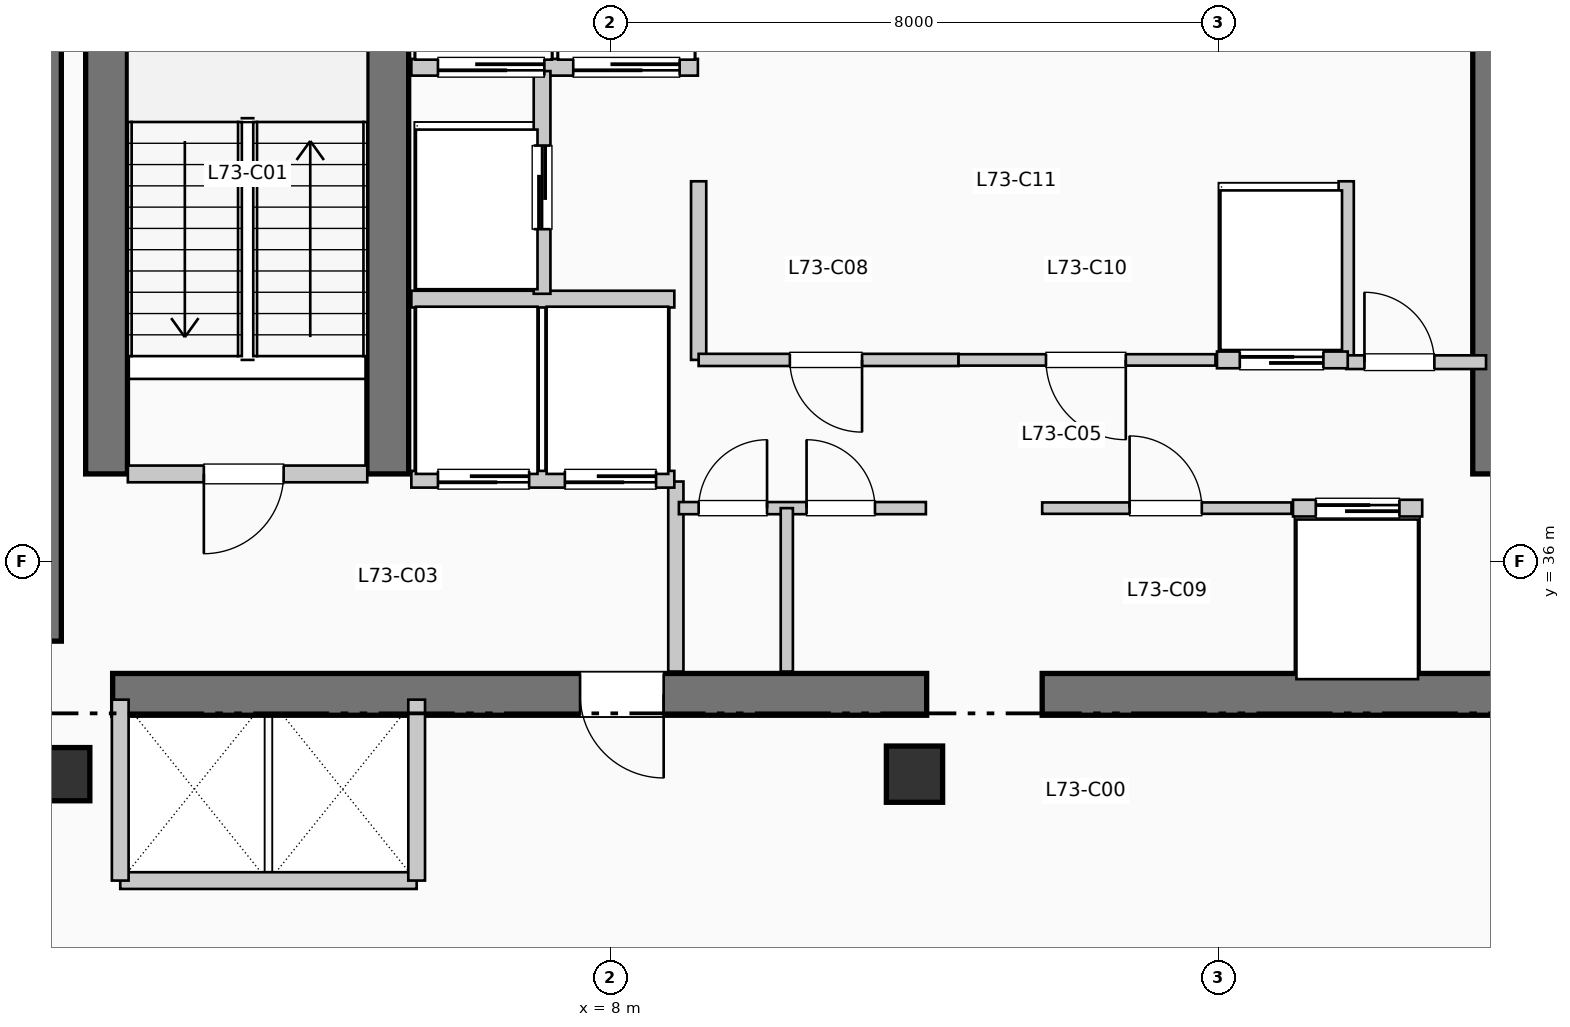
"""IFC4 building model, lengths in metres.
Left out: names, types, materials, properties, quantities, classifications, styles, units other than length and angle.
Written with IfcOpenShell. Run it as: python <this file> out.ifc"""

import sys

from ifc_helpers import new_model, si_unit, direction, frame, frame_2d, origin, origin_2d, place, context, subcontext, project, spatial, rectangle, extrude, element, fill, save


model = new_model("IFC4")
c1 = context("Model", 3, precision=1e-05, world=origin(), true_north=direction((0.0, 1.0)))
c2 = subcontext(c1, "Body", "Model", "MODEL_VIEW")
j1 = project(units=[si_unit("LENGTHUNIT", "METRE"), si_unit("PLANEANGLEUNIT", "RADIAN")], contexts=[c1])
p1 = place(None, origin())
s1 = spatial("IfcSite", under=j1, at=p1, CompositionType="ELEMENT")
p2 = place(p1, origin())
s2 = spatial("IfcBuilding", under=s1, at=p2, CompositionType="ELEMENT")
p3 = place(p2, frame((0.0, 0.0, 299.97)))
s3 = spatial("IfcBuildingStorey", under=s2, at=p3, CompositionType="ELEMENT", Elevation=299.97)
p4 = place(p3, frame((0.5, 34.95, 0.0), z_axis=(0.0, 0.0, 1.0), x_axis=(0.0, 1.0, 0.0)))
e1 = element("IfcWall", 1, at=p4, inside=s3, PredefinedType="SHEAR", context=c2, shape_type="SweptSolid", body=[
    extrude(rectangle(XDim=7.9, YDim=0.55, at=frame_2d((3.95, 0.0))), origin(), (0.0, 0.0, 1.0), 3.96),
])
p5 = place(p3, frame((1.45, 34.25, 0.0), z_axis=(0.0, 0.0, 1.0), x_axis=(1.0, 0.0, 0.0)))
e2 = element("IfcWall", 2, at=p5, inside=s3, PredefinedType="SHEAR", context=c2, shape_type="SweptSolid", body=[
    extrude(rectangle(XDim=10.71, YDim=0.55, at=frame_2d((5.355, 0.0))), origin(), (0.0, 0.0, 1.0), 3.96),
])
p6 = place(p5, frame((7.25, 0.0, 0.0), z_axis=(0.0, 0.0, 1.0), x_axis=(-1.0, 0.0, 0.0)))
e3 = element("IfcOpeningElement", 3, at=p6, cuts=e2, PredefinedType="OPENING", context=c2, shape_type="SweptSolid", body=[
    extrude(rectangle(XDim=1.1, YDim=2.15, at=frame_2d((0.55, 1.075))), frame((0.0, 0.285, 0.0), z_axis=(0.0, -1.0, 0.0), x_axis=(1.0, 0.0, 0.0)), (0.0, 0.0, 1.0), 0.57),
])
p7 = place(p3, frame((13.68, 34.25, 0.0), z_axis=(0.0, 0.0, 1.0), x_axis=(1.0, 0.0, 0.0)))
e4 = element("IfcWall", 4, at=p7, inside=s3, PredefinedType="SHEAR", context=c2, shape_type="SweptSolid", body=[
    extrude(rectangle(XDim=6.12, YDim=0.55, at=frame_2d((3.06, 0.0))), origin(), (0.0, 0.0, 1.0), 3.96),
])
for number, where, z_axis, x_axis in (
    (5, (1.37, 37.15, 0.0), (0.0, 0.0, 1.0), (0.0, 1.0, 0.0)),
    (6, (5.07, 37.15, 0.0), (0.0, 0.0, 1.0), (0.0, 1.0, 0.0)),
    (7, (19.62, 37.15, 0.0), (0.0, 0.0, 1.0), (0.0, 1.0, 0.0)),
):
    element("IfcWall", number, at=place(p3, frame(where, z_axis=z_axis, x_axis=x_axis)), inside=s3, PredefinedType="SHEAR", context=c2, shape_type="SweptSolid", body=[
        extrude(rectangle(XDim=7.89, YDim=0.55, at=frame_2d((3.945, 0.0))), origin(), (0.0, 0.0, 1.0), 3.96),
    ])
p8 = place(p3, frame((0.8, 33.2, 0.0), z_axis=(0.0, 0.0, 1.0), x_axis=(1.0, 0.0, 0.0)))
e8 = element("IfcColumn", 8, at=p8, inside=s3, PredefinedType="COLUMN", context=c2, shape_type="SweptSolid", body=[
    extrude(rectangle(XDim=0.7, YDim=0.7, at=origin_2d()), origin(), (0.0, 0.0, 1.0), 3.96),
])
p9 = place(p3, frame((12.0, 33.2, 0.0), z_axis=(0.0, 0.0, 1.0), x_axis=(1.0, 0.0, 0.0)))
e9 = element("IfcColumn", 9, at=p9, inside=s3, PredefinedType="COLUMN", context=c2, shape_type="SweptSolid", body=[
    extrude(rectangle(XDim=0.74, YDim=0.74, at=origin_2d()), origin(), (0.0, 0.0, 1.0), 3.96),
])
p10 = place(p3, frame((1.65, 37.15, 0.0), z_axis=(0.0, 0.0, 1.0), x_axis=(1.0, 0.0, 0.0)))
e10 = element("IfcWall", 10, at=p10, inside=s3, PredefinedType="PARTITIONING", context=c2, shape_type="SweptSolid", body=[
    extrude(rectangle(XDim=3.15, YDim=0.22, at=frame_2d((1.575, 0.0))), origin(), (0.0, 0.0, 1.0), 3.74),
])
p11 = place(p10, frame((2.05, 0.0, 0.0), z_axis=(0.0, 0.0, 1.0), x_axis=(-1.0, 0.0, 0.0)))
e11 = element("IfcOpeningElement", 11, at=p11, cuts=e10, PredefinedType="OPENING", context=c2, shape_type="SweptSolid", body=[
    extrude(rectangle(XDim=1.05, YDim=2.15, at=frame_2d((0.525, 1.075))), frame((0.0, 0.12, 0.0), z_axis=(0.0, -1.0, 0.0), x_axis=(1.0, 0.0, 0.0)), (0.0, 0.0, 1.0), 0.24),
])
p12 = place(p3, frame((8.86, 34.55, 0.0), z_axis=(0.0, 0.0, 1.0), x_axis=(0.0, 1.0, 0.0)))
e12 = element("IfcWall", 12, at=p12, inside=s3, PredefinedType="PARTITIONING", context=c2, shape_type="SweptSolid", body=[
    extrude(rectangle(XDim=2.5, YDim=0.2, at=frame_2d((1.25, 0.0))), origin(), (0.0, 0.0, 1.0), 3.74),
])
p13 = place(p3, frame((5.38, 37.08, 0.0), z_axis=(0.0, 0.0, 1.0), x_axis=(1.0, 0.0, 0.0)))
e13 = element("IfcWall", 13, at=p13, inside=s3, PredefinedType="PARTITIONING", context=c2, shape_type="SweptSolid", body=[
    extrude(rectangle(XDim=3.46, YDim=0.22, at=frame_2d((1.73, 0.0))), origin(), (0.0, 0.0, 1.0), 3.74),
])
p14 = place(p13, frame((1.55, 0.0, 0.0), z_axis=(0.0, 0.0, 1.0), x_axis=(-1.0, 0.0, 0.0)))
e14 = element("IfcOpeningElement", 14, at=p14, cuts=e13, PredefinedType="OPENING", context=c2, shape_type="SweptSolid", body=[
    extrude(rectangle(XDim=1.2, YDim=2.2, at=frame_2d((0.6, 1.1))), frame((0.0, 0.12, 0.0), z_axis=(0.0, -1.0, 0.0), x_axis=(1.0, 0.0, 0.0)), (0.0, 0.0, 1.0), 0.24),
])
p15 = place(p13, frame((3.22, 0.0, 0.0), z_axis=(0.0, 0.0, 1.0), x_axis=(-1.0, 0.0, 0.0)))
e15 = element("IfcOpeningElement", 15, at=p15, cuts=e13, PredefinedType="OPENING", context=c2, shape_type="SweptSolid", body=[
    extrude(rectangle(XDim=1.2, YDim=2.2, at=frame_2d((0.6, 1.1))), frame((0.0, 0.12, 0.0), z_axis=(0.0, -1.0, 0.0), x_axis=(1.0, 0.0, 0.0)), (0.0, 0.0, 1.0), 0.24),
])
p16 = place(p3, frame((5.38, 39.45, 0.0), z_axis=(0.0, 0.0, 1.0), x_axis=(1.0, 0.0, 0.0)))
e16 = element("IfcWall", 16, at=p16, inside=s3, PredefinedType="PARTITIONING", context=c2, shape_type="SweptSolid", body=[
    extrude(rectangle(XDim=3.46, YDim=0.22, at=frame_2d((1.73, 0.0))), origin(), (0.0, 0.0, 1.0), 3.74),
])
p17 = place(p3, frame((5.38, 42.5, 0.0), z_axis=(0.0, 0.0, 1.0), x_axis=(1.0, 0.0, 0.0)))
e17 = element("IfcWall", 17, at=p17, inside=s3, PredefinedType="PARTITIONING", context=c2, shape_type="SweptSolid", body=[
    extrude(rectangle(XDim=3.77, YDim=0.22, at=frame_2d((1.885, 0.0))), origin(), (0.0, 0.0, 1.0), 3.74),
])
p18 = place(p17, frame((1.75, 0.0, 0.0), z_axis=(0.0, 0.0, 1.0), x_axis=(-1.0, 0.0, 0.0)))
e18 = element("IfcOpeningElement", 18, at=p18, cuts=e17, PredefinedType="OPENING", context=c2, shape_type="SweptSolid", body=[
    extrude(rectangle(XDim=1.4, YDim=2.2, at=frame_2d((0.7, 1.1))), frame((0.0, 0.12, 0.0), z_axis=(0.0, -1.0, 0.0), x_axis=(1.0, 0.0, 0.0)), (0.0, 0.0, 1.0), 0.24),
])
p19 = place(p17, frame((3.53, 0.0, 0.0), z_axis=(0.0, 0.0, 1.0), x_axis=(-1.0, 0.0, 0.0)))
e19 = element("IfcOpeningElement", 19, at=p19, cuts=e17, PredefinedType="OPENING", context=c2, shape_type="SweptSolid", body=[
    extrude(rectangle(XDim=1.4, YDim=2.2, at=frame_2d((0.7, 1.1))), frame((0.0, 0.12, 0.0), z_axis=(0.0, -1.0, 0.0), x_axis=(1.0, 0.0, 0.0)), (0.0, 0.0, 1.0), 0.24),
])
p20 = place(p3, frame((7.1, 39.52, 0.0), z_axis=(0.0, 0.0, 1.0), x_axis=(0.0, 1.0, 0.0)))
e20 = element("IfcWall", 20, at=p20, inside=s3, PredefinedType="PARTITIONING", context=c2, shape_type="SweptSolid", body=[
    extrude(rectangle(XDim=2.93, YDim=0.22, at=frame_2d((1.465, 0.0))), origin(), (0.0, 0.0, 1.0), 3.74),
])
p21 = place(p20, frame((0.85, 0.0, 0.0)))
e21 = element("IfcOpeningElement", 21, at=p21, cuts=e20, PredefinedType="OPENING", context=c2, shape_type="SweptSolid", body=[
    extrude(rectangle(XDim=1.1, YDim=2.2, at=frame_2d((0.55, 1.1))), frame((0.0, 0.12, 0.0), z_axis=(0.0, -1.0, 0.0), x_axis=(1.0, 0.0, 0.0)), (0.0, 0.0, 1.0), 0.24),
])
p22 = place(p3, frame((1.55, 31.8, 0.0), z_axis=(0.0, 0.0, 1.0), x_axis=(1.0, 0.0, 0.0)))
e22 = element("IfcWall", 22, at=p22, inside=s3, PredefinedType="PARTITIONING", context=c2, shape_type="SweptSolid", body=[
    extrude(rectangle(XDim=3.9, YDim=0.22, at=frame_2d((1.95, 0.0))), origin(), (0.0, 0.0, 1.0), 3.74),
])
for number, where, z_axis, x_axis in (
    (23, (1.55, 31.8, 0.0), (0.0, 0.0, 1.0), (0.0, 1.0, 0.0)),
    (24, (5.45, 31.8, 0.0), (0.0, 0.0, 1.0), (0.0, 1.0, 0.0)),
):
    element("IfcWall", number, at=place(p3, frame(where, z_axis=z_axis, x_axis=x_axis)), inside=s3, PredefinedType="PARTITIONING", context=c2, shape_type="SweptSolid", body=[
        extrude(rectangle(XDim=2.38, YDim=0.22, at=frame_2d((1.19, 0.0))), origin(), (0.0, 0.0, 1.0), 3.74),
    ])
for number, where, z_axis, x_axis in (
    (25, (9.16, 38.65, 0.0), (0.0, 0.0, 1.0), (0.0, 1.0, 0.0)),
    (26, (17.68, 38.65, 0.0), (0.0, 0.0, 1.0), (0.0, 1.0, 0.0)),
):
    element("IfcWall", number, at=place(p3, frame(where, z_axis=z_axis, x_axis=x_axis)), inside=s3, PredefinedType="PARTITIONING", context=c2, shape_type="SweptSolid", body=[
        extrude(rectangle(XDim=2.35, YDim=0.2, at=frame_2d((1.175, 0.0))), origin(), (0.0, 0.0, 1.0), 3.74),
    ])
p23 = place(p3, frame((17.68, 38.62, 0.0), z_axis=(0.0, 0.0, 1.0), x_axis=(1.0, 0.0, 0.0)))
e27 = element("IfcWall", 27, at=p23, inside=s3, PredefinedType="PARTITIONING", context=c2, shape_type="SweptSolid", body=[
    extrude(rectangle(XDim=1.84, YDim=0.18, at=frame_2d((0.92, 0.0))), origin(), (0.0, 0.0, 1.0), 3.74),
])
p24 = place(p23, frame((0.24, 0.0, 0.0)))
e28 = element("IfcOpeningElement", 28, at=p24, cuts=e27, PredefinedType="OPENING", context=c2, shape_type="SweptSolid", body=[
    extrude(rectangle(XDim=0.92, YDim=2.1, at=frame_2d((0.46, 1.05))), frame((0.0, 0.1, 0.0), z_axis=(0.0, -1.0, 0.0), x_axis=(1.0, 0.0, 0.0)), (0.0, 0.0, 1.0), 0.2),
])
p25 = place(p3, frame((8.9, 36.7, 0.0), z_axis=(0.0, 0.0, 1.0), x_axis=(1.0, 0.0, 0.0)))
e29 = element("IfcWall", 29, at=p25, inside=s3, PredefinedType="PARTITIONING", context=c2, shape_type="SweptSolid", body=[
    extrude(rectangle(XDim=3.25, YDim=0.16, at=frame_2d((1.625, 0.0))), origin(), (0.0, 0.0, 1.0), 3.74),
])
p26 = place(p25, frame((0.26, 0.0, 0.0)))
e30 = element("IfcOpeningElement", 30, at=p26, cuts=e29, PredefinedType="OPENING", context=c2, shape_type="SweptSolid", body=[
    extrude(rectangle(XDim=0.9, YDim=2.15, at=frame_2d((0.45, 1.075))), frame((0.0, 0.09, 0.0), z_axis=(0.0, -1.0, 0.0), x_axis=(1.0, 0.0, 0.0)), (0.0, 0.0, 1.0), 0.18),
])
p27 = place(p25, frame((1.68, 0.0, 0.0)))
e31 = element("IfcOpeningElement", 31, at=p27, cuts=e29, PredefinedType="OPENING", context=c2, shape_type="SweptSolid", body=[
    extrude(rectangle(XDim=0.9, YDim=2.15, at=frame_2d((0.45, 1.075))), frame((0.0, 0.09, 0.0), z_axis=(0.0, -1.0, 0.0), x_axis=(1.0, 0.0, 0.0)), (0.0, 0.0, 1.0), 0.18),
])
p28 = place(p3, frame((10.32, 34.55, 0.0), z_axis=(0.0, 0.0, 1.0), x_axis=(0.0, 1.0, 0.0)))
e32 = element("IfcWall", 32, at=p28, inside=s3, PredefinedType="PARTITIONING", context=c2, shape_type="SweptSolid", body=[
    extrude(rectangle(XDim=2.15, YDim=0.16, at=frame_2d((1.075, 0.0))), origin(), (0.0, 0.0, 1.0), 3.74),
])
p29 = place(p3, frame((9.16, 38.65, 0.0), z_axis=(0.0, 0.0, 1.0), x_axis=(1.0, 0.0, 0.0)))
e33 = element("IfcWall", 33, at=p29, inside=s3, PredefinedType="PARTITIONING", context=c2, shape_type="SweptSolid", body=[
    extrude(rectangle(XDim=3.42, YDim=0.16, at=frame_2d((1.71, 0.0))), origin(), (0.0, 0.0, 1.0), 3.74),
])
p30 = place(p29, frame((2.15, 0.0, 0.0), z_axis=(0.0, 0.0, 1.0), x_axis=(-1.0, 0.0, 0.0)))
e34 = element("IfcOpeningElement", 34, at=p30, cuts=e33, PredefinedType="OPENING", context=c2, shape_type="SweptSolid", body=[
    extrude(rectangle(XDim=0.95, YDim=2.15, at=frame_2d((0.475, 1.075))), frame((0.0, 0.09, 0.0), z_axis=(0.0, -1.0, 0.0), x_axis=(1.0, 0.0, 0.0)), (0.0, 0.0, 1.0), 0.18),
])
p31 = place(p3, frame((13.68, 36.7, 0.0), z_axis=(0.0, 0.0, 1.0), x_axis=(1.0, 0.0, 0.0)))
e35 = element("IfcWall", 35, at=p31, inside=s3, PredefinedType="PARTITIONING", context=c2, shape_type="SweptSolid", body=[
    extrude(rectangle(XDim=3.28, YDim=0.15, at=frame_2d((1.64, 0.0))), origin(), (0.0, 0.0, 1.0), 3.74),
])
p32 = place(p31, frame((1.15, 0.0, 0.0)))
e36 = element("IfcOpeningElement", 36, at=p32, cuts=e35, PredefinedType="OPENING", context=c2, shape_type="SweptSolid", body=[
    extrude(rectangle(XDim=0.95, YDim=2.15, at=frame_2d((0.475, 1.075))), frame((0.0, 0.085, 0.0), z_axis=(0.0, -1.0, 0.0), x_axis=(1.0, 0.0, 0.0)), (0.0, 0.0, 1.0), 0.17),
])
p33 = place(p3, frame((12.58, 38.65, 0.0), z_axis=(0.0, 0.0, 1.0), x_axis=(1.0, 0.0, 0.0)))
e37 = element("IfcWall", 37, at=p33, inside=s3, PredefinedType="PARTITIONING", context=c2, shape_type="SweptSolid", body=[
    extrude(rectangle(XDim=3.38, YDim=0.15, at=frame_2d((1.69, 0.0))), origin(), (0.0, 0.0, 1.0), 3.74),
])
p34 = place(p33, frame((2.2, 0.0, 0.0), z_axis=(0.0, 0.0, 1.0), x_axis=(-1.0, 0.0, 0.0)))
e38 = element("IfcOpeningElement", 38, at=p34, cuts=e37, PredefinedType="OPENING", context=c2, shape_type="SweptSolid", body=[
    extrude(rectangle(XDim=1.05, YDim=2.15, at=frame_2d((0.525, 1.075))), frame((0.0, 0.085, 0.0), z_axis=(0.0, -1.0, 0.0), x_axis=(1.0, 0.0, 0.0)), (0.0, 0.0, 1.0), 0.17),
])
p35 = place(p3, frame((16.98, 36.7, 0.0), z_axis=(0.0, 0.0, 1.0), x_axis=(1.0, 0.0, 0.0)))
e39 = element("IfcWall", 39, at=p35, inside=s3, PredefinedType="PARTITIONING", context=c2, shape_type="SweptSolid", body=[
    extrude(rectangle(XDim=1.7, YDim=0.22, at=frame_2d((0.85, 0.0))), origin(), (0.0, 0.0, 1.0), 3.74),
])
p36 = place(p35, frame((0.3, 0.0, 0.0)))
e40 = element("IfcOpeningElement", 40, at=p36, cuts=e39, PredefinedType="OPENING", context=c2, shape_type="SweptSolid", body=[
    extrude(rectangle(XDim=1.1, YDim=2.2, at=frame_2d((0.55, 1.1))), frame((0.0, 0.12, 0.0), z_axis=(0.0, -1.0, 0.0), x_axis=(1.0, 0.0, 0.0)), (0.0, 0.0, 1.0), 0.24),
])
p37 = place(p3, frame((15.98, 38.65, 0.0), z_axis=(0.0, 0.0, 1.0), x_axis=(1.0, 0.0, 0.0)))
e41 = element("IfcWall", 41, at=p37, inside=s3, PredefinedType="PARTITIONING", context=c2, shape_type="SweptSolid", body=[
    extrude(rectangle(XDim=1.72, YDim=0.22, at=frame_2d((0.86, 0.0))), origin(), (0.0, 0.0, 1.0), 3.74),
])
p38 = place(p37, frame((0.3, 0.0, 0.0)))
e42 = element("IfcOpeningElement", 42, at=p38, cuts=e41, PredefinedType="OPENING", context=c2, shape_type="SweptSolid", body=[
    extrude(rectangle(XDim=1.1, YDim=2.2, at=frame_2d((0.55, 1.1))), frame((0.0, 0.12, 0.0), z_axis=(0.0, -1.0, 0.0), x_axis=(1.0, 0.0, 0.0)), (0.0, 0.0, 1.0), 0.24),
])
p39 = place(p11, origin())
e43 = element("IfcDoor", 43, at=p39, inside=s3, OperationType="SINGLE_SWING_LEFT", PredefinedType="DOOR", context=c2, shape_type="SweptSolid", body=[
    extrude(rectangle(XDim=1.05, YDim=2.15, at=frame_2d((0.525, 1.075))), frame((0.0, 0.025, 0.0), z_axis=(0.0, -1.0, 0.0), x_axis=(1.0, 0.0, 0.0)), (0.0, 0.0, 1.0), 0.05),
])
fill(e11, e43)
p40 = place(p6, origin())
e44 = element("IfcDoor", 44, at=p40, inside=s3, OperationType="SINGLE_SWING_RIGHT", PredefinedType="DOOR", context=c2, shape_type="SweptSolid", body=[
    extrude(rectangle(XDim=1.1, YDim=2.15, at=frame_2d((0.55, 1.075))), frame((0.0, 0.025, 0.0), z_axis=(0.0, -1.0, 0.0), x_axis=(1.0, 0.0, 0.0)), (0.0, 0.0, 1.0), 0.05),
])
fill(e3, e44)
p41 = place(p14, origin())
e45 = element("IfcDoor", 45, at=p41, inside=s3, OperationType="SLIDING_TO_RIGHT", PredefinedType="DOOR", context=c2, shape_type="SweptSolid", body=[
    extrude(rectangle(XDim=1.2, YDim=2.2, at=frame_2d((0.6, 1.1))), frame((0.0, 0.025, 0.0), z_axis=(0.0, -1.0, 0.0), x_axis=(1.0, 0.0, 0.0)), (0.0, 0.0, 1.0), 0.05),
])
fill(e14, e45)
p42 = place(p15, origin())
e46 = element("IfcDoor", 46, at=p42, inside=s3, OperationType="SLIDING_TO_RIGHT", PredefinedType="DOOR", context=c2, shape_type="SweptSolid", body=[
    extrude(rectangle(XDim=1.2, YDim=2.2, at=frame_2d((0.6, 1.1))), frame((0.0, 0.025, 0.0), z_axis=(0.0, -1.0, 0.0), x_axis=(1.0, 0.0, 0.0)), (0.0, 0.0, 1.0), 0.05),
])
fill(e15, e46)
p43 = place(p18, origin())
e47 = element("IfcDoor", 47, at=p43, inside=s3, OperationType="SLIDING_TO_LEFT", PredefinedType="DOOR", context=c2, shape_type="SweptSolid", body=[
    extrude(rectangle(XDim=1.4, YDim=2.2, at=frame_2d((0.7, 1.1))), frame((0.0, 0.025, 0.0), z_axis=(0.0, -1.0, 0.0), x_axis=(1.0, 0.0, 0.0)), (0.0, 0.0, 1.0), 0.05),
])
fill(e18, e47)
p44 = place(p19, origin())
e48 = element("IfcDoor", 48, at=p44, inside=s3, OperationType="SLIDING_TO_LEFT", PredefinedType="DOOR", context=c2, shape_type="SweptSolid", body=[
    extrude(rectangle(XDim=1.4, YDim=2.2, at=frame_2d((0.7, 1.1))), frame((0.0, 0.025, 0.0), z_axis=(0.0, -1.0, 0.0), x_axis=(1.0, 0.0, 0.0)), (0.0, 0.0, 1.0), 0.05),
])
fill(e19, e48)
p45 = place(p21, origin())
e49 = element("IfcDoor", 49, at=p45, inside=s3, OperationType="SLIDING_TO_LEFT", PredefinedType="DOOR", context=c2, shape_type="SweptSolid", body=[
    extrude(rectangle(XDim=1.1, YDim=2.2, at=frame_2d((0.55, 1.1))), frame((0.0, 0.025, 0.0), z_axis=(0.0, -1.0, 0.0), x_axis=(1.0, 0.0, 0.0)), (0.0, 0.0, 1.0), 0.05),
])
fill(e21, e49)
p46 = place(p24, origin())
e50 = element("IfcDoor", 50, at=p46, inside=s3, OperationType="SINGLE_SWING_LEFT", PredefinedType="DOOR", context=c2, shape_type="SweptSolid", body=[
    extrude(rectangle(XDim=0.92, YDim=2.1, at=frame_2d((0.46, 1.05))), frame((0.0, 0.025, 0.0), z_axis=(0.0, -1.0, 0.0), x_axis=(1.0, 0.0, 0.0)), (0.0, 0.0, 1.0), 0.05),
])
fill(e28, e50)
p47 = place(p26, origin())
e51 = element("IfcDoor", 51, at=p47, inside=s3, OperationType="SINGLE_SWING_RIGHT", PredefinedType="DOOR", context=c2, shape_type="SweptSolid", body=[
    extrude(rectangle(XDim=0.9, YDim=2.15, at=frame_2d((0.45, 1.075))), frame((0.0, 0.025, 0.0), z_axis=(0.0, -1.0, 0.0), x_axis=(1.0, 0.0, 0.0)), (0.0, 0.0, 1.0), 0.05),
])
fill(e30, e51)
p48 = place(p27, origin())
e52 = element("IfcDoor", 52, at=p48, inside=s3, OperationType="SINGLE_SWING_LEFT", PredefinedType="DOOR", context=c2, shape_type="SweptSolid", body=[
    extrude(rectangle(XDim=0.9, YDim=2.15, at=frame_2d((0.45, 1.075))), frame((0.0, 0.025, 0.0), z_axis=(0.0, -1.0, 0.0), x_axis=(1.0, 0.0, 0.0)), (0.0, 0.0, 1.0), 0.05),
])
fill(e31, e52)
p49 = place(p30, origin())
e53 = element("IfcDoor", 53, at=p49, inside=s3, OperationType="SINGLE_SWING_RIGHT", PredefinedType="DOOR", context=c2, shape_type="SweptSolid", body=[
    extrude(rectangle(XDim=0.95, YDim=2.15, at=frame_2d((0.475, 1.075))), frame((0.0, 0.025, 0.0), z_axis=(0.0, -1.0, 0.0), x_axis=(1.0, 0.0, 0.0)), (0.0, 0.0, 1.0), 0.05),
])
fill(e34, e53)
p50 = place(p32, origin())
e54 = element("IfcDoor", 54, at=p50, inside=s3, OperationType="SINGLE_SWING_LEFT", PredefinedType="DOOR", context=c2, shape_type="SweptSolid", body=[
    extrude(rectangle(XDim=0.95, YDim=2.15, at=frame_2d((0.475, 1.075))), frame((0.0, 0.025, 0.0), z_axis=(0.0, -1.0, 0.0), x_axis=(1.0, 0.0, 0.0)), (0.0, 0.0, 1.0), 0.05),
])
fill(e36, e54)
p51 = place(p34, origin())
e55 = element("IfcDoor", 55, at=p51, inside=s3, OperationType="SINGLE_SWING_RIGHT", PredefinedType="DOOR", context=c2, shape_type="SweptSolid", body=[
    extrude(rectangle(XDim=1.05, YDim=2.15, at=frame_2d((0.525, 1.075))), frame((0.0, 0.025, 0.0), z_axis=(0.0, -1.0, 0.0), x_axis=(1.0, 0.0, 0.0)), (0.0, 0.0, 1.0), 0.05),
])
fill(e38, e55)
p52 = place(p36, origin())
e56 = element("IfcDoor", 56, at=p52, inside=s3, OperationType="SLIDING_TO_LEFT", PredefinedType="DOOR", context=c2, shape_type="SweptSolid", body=[
    extrude(rectangle(XDim=1.1, YDim=2.2, at=frame_2d((0.55, 1.1))), frame((0.0, 0.025, 0.0), z_axis=(0.0, -1.0, 0.0), x_axis=(1.0, 0.0, 0.0)), (0.0, 0.0, 1.0), 0.05),
])
fill(e40, e56)
p53 = place(p38, origin())
e57 = element("IfcDoor", 57, at=p53, inside=s3, OperationType="SLIDING_TO_LEFT", PredefinedType="DOOR", context=c2, shape_type="SweptSolid", body=[
    extrude(rectangle(XDim=1.1, YDim=2.2, at=frame_2d((0.55, 1.1))), frame((0.0, 0.025, 0.0), z_axis=(0.0, -1.0, 0.0), x_axis=(1.0, 0.0, 0.0)), (0.0, 0.0, 1.0), 0.05),
])
fill(e42, e57)
save(model, sys.argv[1])
